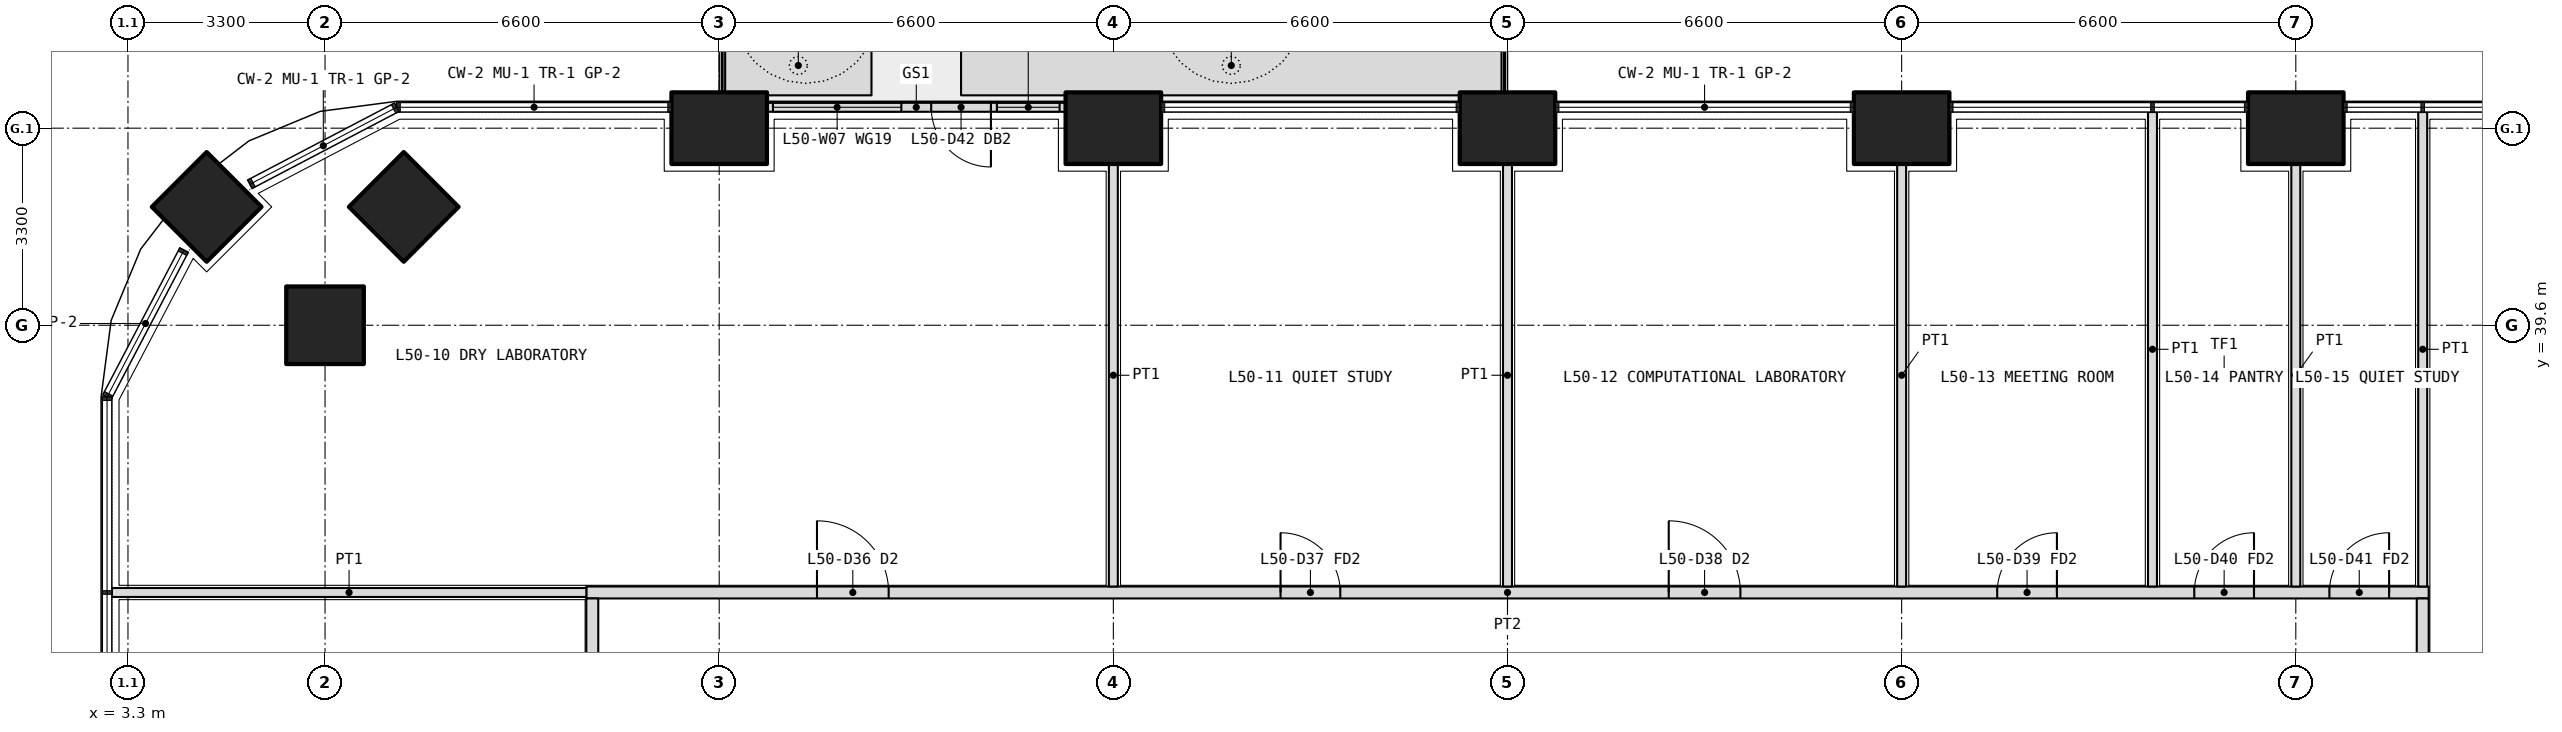
"""IFC4 building model, lengths in metres.
Left out: names, types, materials, properties, quantities, classifications, styles, units other than length and angle.
Written with IfcOpenShell. Run it as: python <this file> out.ifc"""

import sys

from ifc_helpers import new_model, si_unit, direction, frame, frame_2d, origin, origin_2d, place, context, subcontext, project, spatial, polyline, rectangle, outline, extrude, element, fill, save


model = new_model("IFC4")
c1 = context("Model", 3, precision=1e-05, world=origin(), true_north=direction((0.0, 1.0)))
c2 = subcontext(c1, "Body", "Model", "MODEL_VIEW")
j1 = project(units=[si_unit("LENGTHUNIT", "METRE"), si_unit("PLANEANGLEUNIT", "RADIAN")], contexts=[c1])
p1 = place(None, origin())
s1 = spatial("IfcSite", under=j1, at=p1, CompositionType="ELEMENT")
p2 = place(p1, origin())
s2 = spatial("IfcBuilding", under=s1, at=p2, CompositionType="ELEMENT")
p3 = place(p2, frame((0.0, 0.0, 218.7)))
s3 = spatial("IfcBuildingStorey", under=s2, at=p3, CompositionType="ELEMENT", Elevation=218.7)
p4 = place(p3, frame((4.618, 41.582, 0.0), z_axis=(0.0, 0.0, 1.0), x_axis=(0.707106781187, 0.707106781187, 0.0)))
e1 = element("IfcColumn", 1, at=p4, inside=s3, PredefinedType="COLUMN", context=c2, shape_type="SweptSolid", body=[
    extrude(rectangle(XDim=1.3, YDim=1.3, at=origin_2d()), origin(), (0.0, 0.0, 1.0), 4.2),
])
for number, where, z_axis, x_axis in (
    (2, (13.2, 42.9, 0.0), (0.0, 0.0, 1.0), (1.0, 0.0, 0.0)),
    (3, (19.8, 42.9, 0.0), (0.0, 0.0, 1.0), (1.0, 0.0, 0.0)),
    (4, (26.4, 42.9, 0.0), (0.0, 0.0, 1.0), (1.0, 0.0, 0.0)),
    (5, (33.0, 42.9, 0.0), (0.0, 0.0, 1.0), (1.0, 0.0, 0.0)),
    (6, (39.6, 42.9, 0.0), (0.0, 0.0, 1.0), (1.0, 0.0, 0.0)),
):
    element("IfcColumn", number, at=place(p3, frame(where, z_axis=z_axis, x_axis=x_axis)), inside=s3, PredefinedType="COLUMN", context=c2, shape_type="SweptSolid", body=[
        extrude(rectangle(XDim=1.6, YDim=1.2, at=origin_2d()), origin(), (0.0, 0.0, 1.0), 4.2),
    ])
for number, where, z_axis, x_axis in (
    (7, (6.6, 39.6, 0.0), (0.0, 0.0, 1.0), (1.0, 0.0, 0.0)),
    (8, (7.918, 41.582, 0.0), (0.0, 0.0, 1.0), (0.707, 0.707, 0.0)),
):
    element("IfcColumn", number, at=place(p3, frame(where, z_axis=z_axis, x_axis=x_axis)), inside=s3, PredefinedType="COLUMN", context=c2, shape_type="SweptSolid", body=[
        extrude(rectangle(XDim=1.3, YDim=1.3, at=origin_2d()), origin(), (0.0, 0.0, 1.0), 4.2),
    ])
p5 = place(p3, origin())
e9 = element("IfcWall", 9, at=p5, inside=s3, PredefinedType="USERDEFINED", context=c2, shape_type="SweptSolid", body=[
    extrude(outline(polyline([(13.3, 43.45), (15.75, 43.45), (15.75, 44.45), (13.3, 44.45), (13.3, 43.45)]), holes=[polyline([(13.45, 43.6), (15.6, 43.6), (15.6, 44.3), (13.45, 44.3), (13.45, 43.6)])]), origin(), (0.0, 0.0, 1.0), 1.05),
])
p6 = place(p3, origin())
e10 = element("IfcWall", 10, at=p6, inside=s3, PredefinedType="USERDEFINED", context=c2, shape_type="SweptSolid", body=[
    extrude(outline(polyline([(17.25, 43.45), (26.3, 43.45), (26.3, 44.45), (17.25, 44.45), (17.25, 43.45)]), holes=[polyline([(17.4, 43.6), (26.15, 43.6), (26.15, 44.3), (17.4, 44.3), (17.4, 43.6)])]), origin(), (0.0, 0.0, 1.0), 1.05),
])
p7 = place(p3, frame((19.0, 43.25, 0.0), z_axis=(0.0, 0.0, 1.0), x_axis=(-1.0, 0.0, 0.0)))
e11 = element("IfcWall", 11, at=p7, inside=s3, PredefinedType="SOLIDWALL", context=c2, shape_type="SweptSolid", body=[
    extrude(rectangle(XDim=5.0, YDim=0.15, at=frame_2d((2.5, 0.0))), origin(), (0.0, 0.0, 1.0), 2.05),
])
p8 = place(p7, frame((1.25, 0.0, 0.0)))
e12 = element("IfcOpeningElement", 12, at=p8, cuts=e11, PredefinedType="OPENING", context=c2, shape_type="SweptSolid", body=[
    extrude(rectangle(XDim=1.0, YDim=2.0, at=frame_2d((0.5, 1.0))), frame((0.0, 0.085, 0.0), z_axis=(0.0, -1.0, 0.0), x_axis=(1.0, 0.0, 0.0)), (0.0, 0.0, 1.0), 0.17),
])
p9 = place(p7, frame((0.1, 0.0, 0.1)))
e13 = element("IfcOpeningElement", 13, at=p9, cuts=e11, PredefinedType="OPENING", context=c2, shape_type="SweptSolid", body=[
    extrude(rectangle(XDim=1.05, YDim=1.65, at=frame_2d((0.525, 0.825))), frame((0.0, 0.085, 0.0), z_axis=(0.0, -1.0, 0.0), x_axis=(1.0, 0.0, 0.0)), (0.0, 0.0, 1.0), 0.17),
])
p10 = place(p7, frame((2.75, 0.0, 0.1)))
e14 = element("IfcOpeningElement", 14, at=p10, cuts=e11, PredefinedType="OPENING", context=c2, shape_type="SweptSolid", body=[
    extrude(rectangle(XDim=2.15, YDim=1.65, at=frame_2d((1.075, 0.825))), frame((0.0, 0.085, 0.0), z_axis=(0.0, -1.0, 0.0), x_axis=(1.0, 0.0, 0.0)), (0.0, 0.0, 1.0), 0.17),
])
p11 = place(p3, frame((10.975, 35.125, 0.0), z_axis=(0.0, 0.0, 1.0), x_axis=(1.0, 0.0, 0.0)))
e15 = element("IfcWall", 15, at=p11, inside=s3, PredefinedType="PARTITIONING", context=c2, shape_type="SweptSolid", body=[
    extrude(rectangle(XDim=30.85, YDim=0.2, at=frame_2d((15.425, 0.0))), origin(), (0.0, 0.0, 1.0), 2.55),
])
p12 = place(p11, frame((3.863, 0.0, 0.0)))
e16 = element("IfcOpeningElement", 16, at=p12, cuts=e15, PredefinedType="OPENING", context=c2, shape_type="SweptSolid", body=[
    extrude(rectangle(XDim=1.2, YDim=2.1, at=frame_2d((0.6, 1.05))), frame((0.0, 0.11, 0.0), z_axis=(0.0, -1.0, 0.0), x_axis=(1.0, 0.0, 0.0)), (0.0, 0.0, 1.0), 0.22),
])
p13 = place(p11, frame((11.625, 0.0, 0.0)))
e17 = element("IfcOpeningElement", 17, at=p13, cuts=e15, PredefinedType="OPENING", context=c2, shape_type="SweptSolid", body=[
    extrude(rectangle(XDim=1.0, YDim=2.1, at=frame_2d((0.5, 1.05))), frame((0.0, 0.11, 0.0), z_axis=(0.0, -1.0, 0.0), x_axis=(1.0, 0.0, 0.0)), (0.0, 0.0, 1.0), 0.22),
])
p14 = place(p11, frame((18.125, 0.0, 0.0)))
e18 = element("IfcOpeningElement", 18, at=p14, cuts=e15, PredefinedType="OPENING", context=c2, shape_type="SweptSolid", body=[
    extrude(rectangle(XDim=1.2, YDim=2.1, at=frame_2d((0.6, 1.05))), frame((0.0, 0.11, 0.0), z_axis=(0.0, -1.0, 0.0), x_axis=(1.0, 0.0, 0.0)), (0.0, 0.0, 1.0), 0.22),
])
p15 = place(p11, frame((23.625, 0.0, 0.0)))
e19 = element("IfcOpeningElement", 19, at=p15, cuts=e15, PredefinedType="OPENING", context=c2, shape_type="SweptSolid", body=[
    extrude(rectangle(XDim=1.0, YDim=2.1, at=frame_2d((0.5, 1.05))), frame((0.0, 0.11, 0.0), z_axis=(0.0, -1.0, 0.0), x_axis=(1.0, 0.0, 0.0)), (0.0, 0.0, 1.0), 0.22),
])
p16 = place(p11, frame((26.925, 0.0, 0.0)))
e20 = element("IfcOpeningElement", 20, at=p16, cuts=e15, PredefinedType="OPENING", context=c2, shape_type="SweptSolid", body=[
    extrude(rectangle(XDim=1.0, YDim=2.1, at=frame_2d((0.5, 1.05))), frame((0.0, 0.11, 0.0), z_axis=(0.0, -1.0, 0.0), x_axis=(1.0, 0.0, 0.0)), (0.0, 0.0, 1.0), 0.22),
])
p17 = place(p11, frame((29.188, 0.0, 0.0)))
e21 = element("IfcOpeningElement", 21, at=p17, cuts=e15, PredefinedType="OPENING", context=c2, shape_type="SweptSolid", body=[
    extrude(rectangle(XDim=1.0, YDim=2.1, at=frame_2d((0.5, 1.05))), frame((0.0, 0.11, 0.0), z_axis=(0.0, -1.0, 0.0), x_axis=(1.0, 0.0, 0.0)), (0.0, 0.0, 1.0), 0.22),
])
p18 = place(p3, frame((11.075, 11.175, 0.0), z_axis=(0.0, 0.0, 1.0), x_axis=(0.0, 1.0, 0.0)))
e22 = element("IfcWall", 22, at=p18, inside=s3, PredefinedType="PARTITIONING", context=c2, shape_type="SweptSolid", body=[
    extrude(rectangle(XDim=23.85, YDim=0.2, at=frame_2d((11.925, 0.0))), origin(), (0.0, 0.0, 1.0), 2.55),
])
p19 = place(p18, frame((0.462, 0.0, 0.0)))
e23 = element("IfcOpeningElement", 23, at=p19, cuts=e22, PredefinedType="OPENING", context=c2, shape_type="SweptSolid", body=[
    extrude(rectangle(XDim=1.0, YDim=2.1, at=frame_2d((0.5, 1.05))), frame((0.0, 0.11, 0.0), z_axis=(0.0, -1.0, 0.0), x_axis=(1.0, 0.0, 0.0)), (0.0, 0.0, 1.0), 0.22),
])
p20 = place(p18, frame((3.125, 0.0, 0.0)))
e24 = element("IfcOpeningElement", 24, at=p20, cuts=e22, PredefinedType="OPENING", context=c2, shape_type="SweptSolid", body=[
    extrude(rectangle(XDim=1.0, YDim=2.1, at=frame_2d((0.5, 1.05))), frame((0.0, 0.11, 0.0), z_axis=(0.0, -1.0, 0.0), x_axis=(1.0, 0.0, 0.0)), (0.0, 0.0, 1.0), 0.22),
])
p21 = place(p18, frame((6.475, 0.0, 0.0)))
e25 = element("IfcOpeningElement", 25, at=p21, cuts=e22, PredefinedType="OPENING", context=c2, shape_type="SweptSolid", body=[
    extrude(rectangle(XDim=0.9, YDim=2.1, at=frame_2d((0.45, 1.05))), frame((0.0, 0.11, 0.0), z_axis=(0.0, -1.0, 0.0), x_axis=(1.0, 0.0, 0.0)), (0.0, 0.0, 1.0), 0.22),
])
p22 = place(p18, frame((9.675, 0.0, 0.0)))
e26 = element("IfcOpeningElement", 26, at=p22, cuts=e22, PredefinedType="OPENING", context=c2, shape_type="SweptSolid", body=[
    extrude(rectangle(XDim=0.9, YDim=2.1, at=frame_2d((0.45, 1.05))), frame((0.0, 0.11, 0.0), z_axis=(0.0, -1.0, 0.0), x_axis=(1.0, 0.0, 0.0)), (0.0, 0.0, 1.0), 0.22),
])
p23 = place(p18, frame((12.925, 0.0, 0.0)))
e27 = element("IfcOpeningElement", 27, at=p23, cuts=e22, PredefinedType="OPENING", context=c2, shape_type="SweptSolid", body=[
    extrude(rectangle(XDim=1.0, YDim=2.1, at=frame_2d((0.5, 1.05))), frame((0.0, 0.11, 0.0), z_axis=(0.0, -1.0, 0.0), x_axis=(1.0, 0.0, 0.0)), (0.0, 0.0, 1.0), 0.22),
])
p24 = place(p18, frame((19.087, 0.0, 0.0)))
e28 = element("IfcOpeningElement", 28, at=p24, cuts=e22, PredefinedType="OPENING", context=c2, shape_type="SweptSolid", body=[
    extrude(rectangle(XDim=1.0, YDim=2.1, at=frame_2d((0.5, 1.05))), frame((0.0, 0.11, 0.0), z_axis=(0.0, -1.0, 0.0), x_axis=(1.0, 0.0, 0.0)), (0.0, 0.0, 1.0), 0.22),
])
p25 = place(p3, frame((41.725, 11.175, 0.0), z_axis=(0.0, 0.0, 1.0), x_axis=(0.0, 1.0, 0.0)))
e29 = element("IfcWall", 29, at=p25, inside=s3, PredefinedType="PARTITIONING", context=c2, shape_type="SweptSolid", body=[
    extrude(rectangle(XDim=23.85, YDim=0.2, at=frame_2d((11.925, 0.0))), origin(), (0.0, 0.0, 1.0), 2.55),
])
p26 = place(p25, frame((3.762, 0.0, 0.0)))
e30 = element("IfcOpeningElement", 30, at=p26, cuts=e29, PredefinedType="OPENING", context=c2, shape_type="SweptSolid", body=[
    extrude(rectangle(XDim=1.0, YDim=2.1, at=frame_2d((0.5, 1.05))), frame((0.0, 0.11, 0.0), z_axis=(0.0, -1.0, 0.0), x_axis=(1.0, 0.0, 0.0)), (0.0, 0.0, 1.0), 0.22),
])
p27 = place(p25, frame((9.625, 0.0, 0.0)))
e31 = element("IfcOpeningElement", 31, at=p27, cuts=e29, PredefinedType="OPENING", context=c2, shape_type="SweptSolid", body=[
    extrude(rectangle(XDim=1.0, YDim=2.1, at=frame_2d((0.5, 1.05))), frame((0.0, 0.11, 0.0), z_axis=(0.0, -1.0, 0.0), x_axis=(1.0, 0.0, 0.0)), (0.0, 0.0, 1.0), 0.22),
])
p28 = place(p25, frame((12.975, 0.0, 0.0)))
e32 = element("IfcOpeningElement", 32, at=p28, cuts=e29, PredefinedType="OPENING", context=c2, shape_type="SweptSolid", body=[
    extrude(rectangle(XDim=0.9, YDim=2.1, at=frame_2d((0.45, 1.05))), frame((0.0, 0.11, 0.0), z_axis=(0.0, -1.0, 0.0), x_axis=(1.0, 0.0, 0.0)), (0.0, 0.0, 1.0), 0.22),
])
p29 = place(p25, frame((19.087, 0.0, 0.0)))
e33 = element("IfcOpeningElement", 33, at=p29, cuts=e29, PredefinedType="OPENING", context=c2, shape_type="SweptSolid", body=[
    extrude(rectangle(XDim=1.0, YDim=2.1, at=frame_2d((0.5, 1.05))), frame((0.0, 0.11, 0.0), z_axis=(0.0, -1.0, 0.0), x_axis=(1.0, 0.0, 0.0)), (0.0, 0.0, 1.0), 0.22),
])
p30 = place(p3, frame((41.725, 43.17, 0.0), z_axis=(0.0, 0.0, 1.0), x_axis=(0.0, -1.0, 0.0)))
e34 = element("IfcWall", 34, at=p30, inside=s3, PredefinedType="PARTITIONING", context=c2, shape_type="SweptSolid", body=[
    extrude(rectangle(XDim=7.945, YDim=0.15, at=frame_2d((3.972, 0.0))), origin(), (0.0, 0.0, 1.0), 3.85),
])
p31 = place(p3, frame((3.03, 35.125, 0.0), z_axis=(0.0, 0.0, 1.0), x_axis=(1.0, 0.0, 0.0)))
e35 = element("IfcWall", 35, at=p31, inside=s3, PredefinedType="PARTITIONING", context=c2, shape_type="SweptSolid", body=[
    extrude(rectangle(XDim=7.945, YDim=0.15, at=frame_2d((3.973, 0.0))), origin(), (0.0, 0.0, 1.0), 3.85),
])
p32 = place(p3, frame((37.2, 43.17, 0.0), z_axis=(0.0, 0.0, 1.0), x_axis=(0.0, -1.0, 0.0)))
e36 = element("IfcWall", 36, at=p32, inside=s3, PredefinedType="PARTITIONING", context=c2, shape_type="SweptSolid", body=[
    extrude(rectangle(XDim=7.945, YDim=0.15, at=frame_2d((3.972, 0.0))), origin(), (0.0, 0.0, 1.0), 3.85),
])
for number, where, z_axis, x_axis in (
    (37, (39.6, 42.3, 0.0), (0.0, 0.0, 1.0), (0.0, -1.0, 0.0)),
    (38, (19.8, 42.3, 0.0), (0.0, 0.0, 1.0), (0.0, -1.0, 0.0)),
    (39, (26.4, 42.3, 0.0), (0.0, 0.0, 1.0), (0.0, -1.0, 0.0)),
    (40, (33.0, 42.3, 0.0), (0.0, 0.0, 1.0), (0.0, -1.0, 0.0)),
):
    element("IfcWall", number, at=place(p3, frame(where, z_axis=z_axis, x_axis=x_axis)), inside=s3, PredefinedType="PARTITIONING", context=c2, shape_type="SweptSolid", body=[
        extrude(rectangle(XDim=7.075, YDim=0.15, at=frame_2d((3.538, 0.0))), origin(), (0.0, 0.0, 1.0), 2.55),
    ])
p33 = place(p8, origin())
e41 = element("IfcDoor", 41, at=p33, inside=s3, OperationType="SINGLE_SWING_LEFT", PredefinedType="DOOR", context=c2, shape_type="SweptSolid", body=[
    extrude(rectangle(XDim=1.0, YDim=2.0, at=frame_2d((0.5, 1.0))), frame((0.0, 0.025, 0.0), z_axis=(0.0, -1.0, 0.0), x_axis=(1.0, 0.0, 0.0)), (0.0, 0.0, 1.0), 0.05),
])
fill(e12, e41)
p34 = place(p9, origin())
e42 = element("IfcWindow", 42, at=p34, inside=s3, PartitioningType="SINGLE_PANEL", PredefinedType="WINDOW", context=c2, shape_type="SweptSolid", body=[
    extrude(rectangle(XDim=1.05, YDim=1.65, at=frame_2d((0.525, 0.825))), frame((0.0, 0.03, 0.0), z_axis=(0.0, -1.0, 0.0), x_axis=(1.0, 0.0, 0.0)), (0.0, 0.0, 1.0), 0.06),
])
fill(e13, e42)
p35 = place(p10, origin())
e43 = element("IfcWindow", 43, at=p35, inside=s3, PartitioningType="SINGLE_PANEL", PredefinedType="WINDOW", context=c2, shape_type="SweptSolid", body=[
    extrude(rectangle(XDim=2.15, YDim=1.65, at=frame_2d((1.075, 0.825))), frame((0.0, 0.03, 0.0), z_axis=(0.0, -1.0, 0.0), x_axis=(1.0, 0.0, 0.0)), (0.0, 0.0, 1.0), 0.06),
])
fill(e14, e43)
p36 = place(p12, origin())
e44 = element("IfcDoor", 44, at=p36, inside=s3, OperationType="DOUBLE_DOOR_SINGLE_SWING", PredefinedType="DOOR", context=c2, shape_type="SweptSolid", body=[
    extrude(rectangle(XDim=1.2, YDim=2.1, at=frame_2d((0.6, 1.05))), frame((0.0, 0.025, 0.0), z_axis=(0.0, -1.0, 0.0), x_axis=(1.0, 0.0, 0.0)), (0.0, 0.0, 1.0), 0.05),
])
fill(e16, e44)
p37 = place(p13, origin())
e45 = element("IfcDoor", 45, at=p37, inside=s3, OperationType="SINGLE_SWING_LEFT", PredefinedType="DOOR", context=c2, shape_type="SweptSolid", body=[
    extrude(rectangle(XDim=1.0, YDim=2.1, at=frame_2d((0.5, 1.05))), frame((0.0, 0.025, 0.0), z_axis=(0.0, -1.0, 0.0), x_axis=(1.0, 0.0, 0.0)), (0.0, 0.0, 1.0), 0.05),
])
fill(e17, e45)
p38 = place(p14, origin())
e46 = element("IfcDoor", 46, at=p38, inside=s3, OperationType="DOUBLE_DOOR_SINGLE_SWING", PredefinedType="DOOR", context=c2, shape_type="SweptSolid", body=[
    extrude(rectangle(XDim=1.2, YDim=2.1, at=frame_2d((0.6, 1.05))), frame((0.0, 0.025, 0.0), z_axis=(0.0, -1.0, 0.0), x_axis=(1.0, 0.0, 0.0)), (0.0, 0.0, 1.0), 0.05),
])
fill(e18, e46)
p39 = place(p15, origin())
e47 = element("IfcDoor", 47, at=p39, inside=s3, OperationType="SINGLE_SWING_RIGHT", PredefinedType="DOOR", context=c2, shape_type="SweptSolid", body=[
    extrude(rectangle(XDim=1.0, YDim=2.1, at=frame_2d((0.5, 1.05))), frame((0.0, 0.025, 0.0), z_axis=(0.0, -1.0, 0.0), x_axis=(1.0, 0.0, 0.0)), (0.0, 0.0, 1.0), 0.05),
])
fill(e19, e47)
p40 = place(p16, origin())
e48 = element("IfcDoor", 48, at=p40, inside=s3, OperationType="SINGLE_SWING_RIGHT", PredefinedType="DOOR", context=c2, shape_type="SweptSolid", body=[
    extrude(rectangle(XDim=1.0, YDim=2.1, at=frame_2d((0.5, 1.05))), frame((0.0, 0.025, 0.0), z_axis=(0.0, -1.0, 0.0), x_axis=(1.0, 0.0, 0.0)), (0.0, 0.0, 1.0), 0.05),
])
fill(e20, e48)
p41 = place(p17, origin())
e49 = element("IfcDoor", 49, at=p41, inside=s3, OperationType="SINGLE_SWING_RIGHT", PredefinedType="DOOR", context=c2, shape_type="SweptSolid", body=[
    extrude(rectangle(XDim=1.0, YDim=2.1, at=frame_2d((0.5, 1.05))), frame((0.0, 0.025, 0.0), z_axis=(0.0, -1.0, 0.0), x_axis=(1.0, 0.0, 0.0)), (0.0, 0.0, 1.0), 0.05),
])
fill(e21, e49)
save(model, sys.argv[1])
